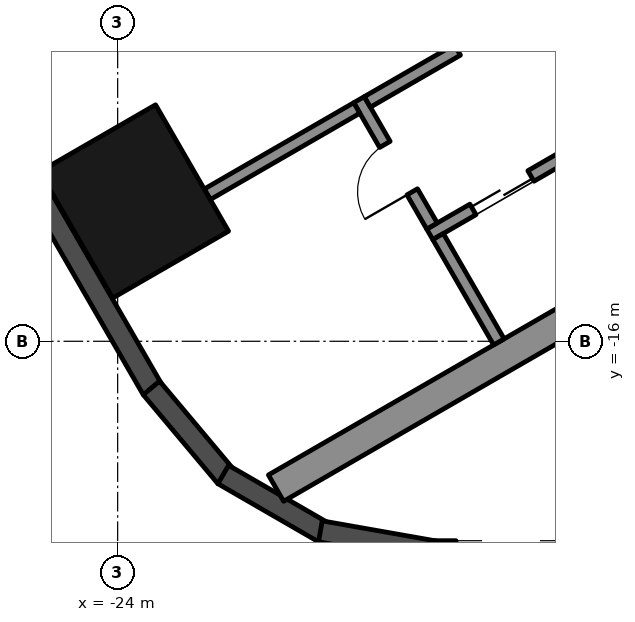
"""IFC4 building model, lengths in metres.
Left out: names, types, materials, properties, quantities, classifications, styles, units other than length and angle.
Written with IfcOpenShell. Run it as: python <this file> out.ifc"""

import sys

from ifc_helpers import new_model, si_unit, direction, frame, frame_2d, origin, origin_2d, place, context, subcontext, project, spatial, rectangle, hollow_rectangle, extrude, element, fill, save


model = new_model("IFC4")
c1 = context("Model", 3, precision=1e-05, world=origin(), true_north=direction((0.0, 1.0)))
c2 = subcontext(c1, "Body", "Model", "MODEL_VIEW")
j1 = project(units=[si_unit("LENGTHUNIT", "METRE"), si_unit("PLANEANGLEUNIT", "RADIAN")], contexts=[c1])
p1 = place(None, origin())
s1 = spatial("IfcSite", under=j1, at=p1, CompositionType="ELEMENT")
p2 = place(p1, origin())
s2 = spatial("IfcBuilding", under=s1, at=p2, CompositionType="ELEMENT")
p3 = place(p2, frame((0.0, 0.0, 183.6)))
s3 = spatial("IfcBuildingStorey", under=s2, at=p3, CompositionType="ELEMENT", Elevation=183.6)
p4 = place(p3, frame((-23.729, -13.7, 0.0), z_axis=(0.0, 0.0, 1.0), x_axis=(-0.5, 0.866025403784, 0.0)))
e1 = element("IfcColumn", 1, at=p4, inside=s3, PredefinedType="COLUMN", context=c2, shape_type="SweptSolid", body=[
    extrude(hollow_rectangle(XDim=2.4, YDim=2.2, WallThickness=0.06, at=origin_2d()), origin(), (0.0, 0.0, 1.0), 3.7),
])
p5 = place(p3, frame((-26.257, -11.893, 0.0), z_axis=(0.0, 0.0, 1.0), x_axis=(0.500018773155, -0.866014564827, 0.0)))
e2 = element("IfcWall", 2, at=p5, inside=s3, PredefinedType="SOLIDWALL", context=c2, shape_type="SweptSolid", body=[
    extrude(rectangle(XDim=5.658, YDim=0.35, at=frame_2d((2.829, 0.0))), origin(), (0.0, 0.0, 1.0), 3.55),
])
for number, where, z_axis, x_axis in (
    (3, (-23.445, -16.768, 0.0), (0.0, 0.0, 1.0), (0.643, -0.766, 0.0)),
    (4, (-22.264, -18.192, 0.0), (0.0, 0.0, 1.0), (0.866, -0.5, 0.0)),
):
    element("IfcWall", number, at=place(p3, frame(where, z_axis=z_axis, x_axis=x_axis)), inside=s3, PredefinedType="SOLIDWALL", context=c2, shape_type="SweptSolid", body=[
        extrude(rectangle(XDim=1.91, YDim=0.35, at=frame_2d((0.955, 0.0))), origin(), (0.0, 0.0, 1.0), 3.55),
    ])
p6 = place(p3, frame((-20.667, -19.126, 0.0), z_axis=(0.0, 0.0, 1.0), x_axis=(0.984798995425, -0.173697837091, 0.0)))
e5 = element("IfcWall", 5, at=p6, inside=s3, PredefinedType="SOLIDWALL", context=c2, shape_type="SweptSolid", body=[
    extrude(rectangle(XDim=1.91, YDim=0.35, at=frame_2d((0.955, 0.0))), origin(), (0.0, 0.0, 1.0), 3.55),
])
p7 = place(p3, frame((-18.816, -19.455, 0.0), z_axis=(0.0, 0.0, 1.0), x_axis=(1.0, 0.0, 0.0)))
e6 = element("IfcWall", 6, at=p7, inside=s3, PredefinedType="SOLIDWALL", context=c2, shape_type="SweptSolid", body=[
    extrude(rectangle(XDim=11.816, YDim=0.35, at=frame_2d((5.908, 0.0))), origin(), (0.0, 0.0, 1.0), 3.55),
])
p8 = place(p7, frame((0.381, 0.0, 0.3)))
e7 = element("IfcOpeningElement", 7, at=p8, cuts=e6, PredefinedType="OPENING", context=c2, shape_type="SweptSolid", body=[
    extrude(rectangle(XDim=1.8, YDim=2.65, at=frame_2d((0.9, 1.325))), frame((0.0, 0.185, 0.0), z_axis=(0.0, -1.0, 0.0), x_axis=(1.0, 0.0, 0.0)), (0.0, 0.0, 1.0), 0.37),
])
p9 = place(p7, frame((7.74, 0.0, 0.0)))
e8 = element("IfcOpeningElement", 8, at=p9, cuts=e6, PredefinedType="OPENING", context=c2, shape_type="SweptSolid", body=[
    extrude(rectangle(XDim=2.4, YDim=2.4, at=frame_2d((1.2, 1.2))), frame((0.0, 0.185, 0.0), z_axis=(0.0, -1.0, 0.0), x_axis=(1.0, 0.0, 0.0)), (0.0, 0.0, 1.0), 0.37),
])
p10 = place(p7, frame((3.791, 0.0, 0.3)))
e9 = element("IfcOpeningElement", 9, at=p10, cuts=e6, PredefinedType="OPENING", context=c2, shape_type="SweptSolid", body=[
    extrude(rectangle(XDim=1.6, YDim=2.65, at=frame_2d((0.8, 1.325))), frame((0.0, 0.185, 0.0), z_axis=(0.0, -1.0, 0.0), x_axis=(1.0, 0.0, 0.0)), (0.0, 0.0, 1.0), 0.37),
])
p11 = place(p7, frame((5.691, 0.0, 0.3)))
e10 = element("IfcOpeningElement", 10, at=p11, cuts=e6, PredefinedType="OPENING", context=c2, shape_type="SweptSolid", body=[
    extrude(rectangle(XDim=1.6, YDim=2.65, at=frame_2d((0.8, 1.325))), frame((0.0, 0.185, 0.0), z_axis=(0.0, -1.0, 0.0), x_axis=(1.0, 0.0, 0.0)), (0.0, 0.0, 1.0), 0.37),
])
p12 = place(p3, frame((-8.547, -10.997, 0.0), z_axis=(0.0, 0.0, 1.0), x_axis=(-0.866025009528, -0.500000682871, 0.0)))
e11 = element("IfcWall", 11, at=p12, inside=s3, PredefinedType="SHEAR", context=c2, shape_type="SweptSolid", body=[
    extrude(rectangle(XDim=14.837, YDim=0.5, at=frame_2d((7.418, 0.0))), origin(), (0.0, 0.0, 1.0), 3.5),
])
p13 = place(p3, frame((-10.068, -9.162, 0.0), z_axis=(0.0, 0.0, 1.0), x_axis=(-0.866032725843, -0.499987317609, 0.0)))
e12 = element("IfcWall", 12, at=p13, inside=s3, PredefinedType="SHEAR", context=c2, shape_type="SweptSolid", body=[
    extrude(rectangle(XDim=10.16, YDim=0.2, at=frame_2d((5.08, 0.0))), origin(), (0.0, 0.0, 1.0), 3.5),
])
p14 = place(p13, frame((0.62, 0.0, 0.0)))
e13 = element("IfcOpeningElement", 13, at=p14, cuts=e12, PredefinedType="OPENING", context=c2, shape_type="SweptSolid", body=[
    extrude(rectangle(XDim=1.1, YDim=2.1, at=frame_2d((0.55, 1.05))), frame((0.0, 0.11, 0.0), z_axis=(0.0, -1.0, 0.0), x_axis=(1.0, 0.0, 0.0)), (0.0, 0.0, 1.0), 0.22),
])
p15 = place(p13, frame((3.16, 0.0, 0.0)))
e14 = element("IfcOpeningElement", 14, at=p15, cuts=e12, PredefinedType="OPENING", context=c2, shape_type="SweptSolid", body=[
    extrude(rectangle(XDim=1.1, YDim=2.1, at=frame_2d((0.55, 1.05))), frame((0.0, 0.11, 0.0), z_axis=(0.0, -1.0, 0.0), x_axis=(1.0, 0.0, 0.0)), (0.0, 0.0, 1.0), 0.22),
])
p16 = place(p13, frame((5.7, 0.0, 0.0)))
e15 = element("IfcOpeningElement", 15, at=p16, cuts=e12, PredefinedType="OPENING", context=c2, shape_type="SweptSolid", body=[
    extrude(rectangle(XDim=1.1, YDim=2.1, at=frame_2d((0.55, 1.05))), frame((0.0, 0.11, 0.0), z_axis=(0.0, -1.0, 0.0), x_axis=(1.0, 0.0, 0.0)), (0.0, 0.0, 1.0), 0.22),
])
p17 = place(p13, frame((8.24, 0.0, 0.0)))
e16 = element("IfcOpeningElement", 16, at=p17, cuts=e12, PredefinedType="OPENING", context=c2, shape_type="SweptSolid", body=[
    extrude(rectangle(XDim=1.1, YDim=2.1, at=frame_2d((0.55, 1.05))), frame((0.0, 0.11, 0.0), z_axis=(0.0, -1.0, 0.0), x_axis=(1.0, 0.0, 0.0)), (0.0, 0.0, 1.0), 0.22),
])
p18 = place(p3, frame((-20.031, -12.026, 0.0), z_axis=(0.0, 0.0, 1.0), x_axis=(0.500033551112, -0.866006032174, 0.0)))
e17 = element("IfcWall", 17, at=p18, inside=s3, PredefinedType="SHEAR", context=c2, shape_type="SweptSolid", body=[
    extrude(rectangle(XDim=2.4, YDim=0.2, at=frame_2d((1.2, 0.0))), origin(), (0.0, 0.0, 1.0), 3.5),
])
p19 = place(p18, frame((0.85, 0.0, 0.0)))
e18 = element("IfcOpeningElement", 18, at=p19, cuts=e17, PredefinedType="OPENING", context=c2, shape_type="SweptSolid", body=[
    extrude(rectangle(XDim=0.9, YDim=2.1, at=frame_2d((0.45, 1.05))), frame((0.0, 0.11, 0.0), z_axis=(0.0, -1.0, 0.0), x_axis=(1.0, 0.0, 0.0)), (0.0, 0.0, 1.0), 0.22),
])
p20 = place(p3, frame((-18.413, -11.208, 0.0), z_axis=(0.0, 0.0, 1.0), x_axis=(-0.866038183914, -0.499977863513, 0.0)))
e19 = element("IfcWall", 19, at=p20, inside=s3, PredefinedType="SHEAR", context=c2, shape_type="SweptSolid", body=[
    extrude(rectangle(XDim=1.71, YDim=0.2, at=frame_2d((0.855, 0.0))), origin(), (0.0, 0.0, 1.0), 3.5),
])
p21 = place(p3, frame((-18.73, -14.278, 0.0), z_axis=(0.0, 0.0, 1.0), x_axis=(0.50002537861, -0.866010750942, 0.0)))
e20 = element("IfcWall", 20, at=p21, inside=s3, PredefinedType="SHEAR", context=c2, shape_type="SweptSolid", body=[
    extrude(rectangle(XDim=2.0, YDim=0.2, at=frame_2d((1.0, 0.0))), origin(), (0.0, 0.0, 1.0), 3.5),
])
p22 = place(p3, frame((-20.067, -12.163, 0.0), z_axis=(0.0, 0.0, 1.0), x_axis=(-0.866055327414, -0.49994816717, 0.0)))
e21 = element("IfcWall", 21, at=p22, inside=s3, PredefinedType="SHEAR", context=c2, shape_type="SweptSolid", body=[
    extrude(rectangle(XDim=2.84, YDim=0.2, at=frame_2d((1.42, 0.0))), origin(), (0.0, 0.0, 1.0), 3.5),
])
p23 = place(p17, origin())
e22 = element("IfcDoor", 22, at=p23, inside=s3, OperationType="DOUBLE_DOOR_SLIDING", PredefinedType="DOOR", context=c2, shape_type="SweptSolid", body=[
    extrude(rectangle(XDim=1.1, YDim=2.1, at=frame_2d((0.55, 1.05))), frame((0.0, 0.025, 0.0), z_axis=(0.0, -1.0, 0.0), x_axis=(1.0, 0.0, 0.0)), (0.0, 0.0, 1.0), 0.05),
])
fill(e16, e22)
p24 = place(p19, frame((0.9, 0.0, 0.0), z_axis=(0.0, 0.0, 1.0), x_axis=(-1.0, 0.0, 0.0)))
e23 = element("IfcDoor", 23, at=p24, inside=s3, OperationType="SINGLE_SWING_LEFT", PredefinedType="DOOR", context=c2, shape_type="SweptSolid", body=[
    extrude(rectangle(XDim=0.9, YDim=2.1, at=frame_2d((0.45, 1.05))), frame((0.0, 0.025, 0.0), z_axis=(0.0, -1.0, 0.0), x_axis=(1.0, 0.0, 0.0)), (0.0, 0.0, 1.0), 0.05),
])
fill(e18, e23)
save(model, sys.argv[1])
